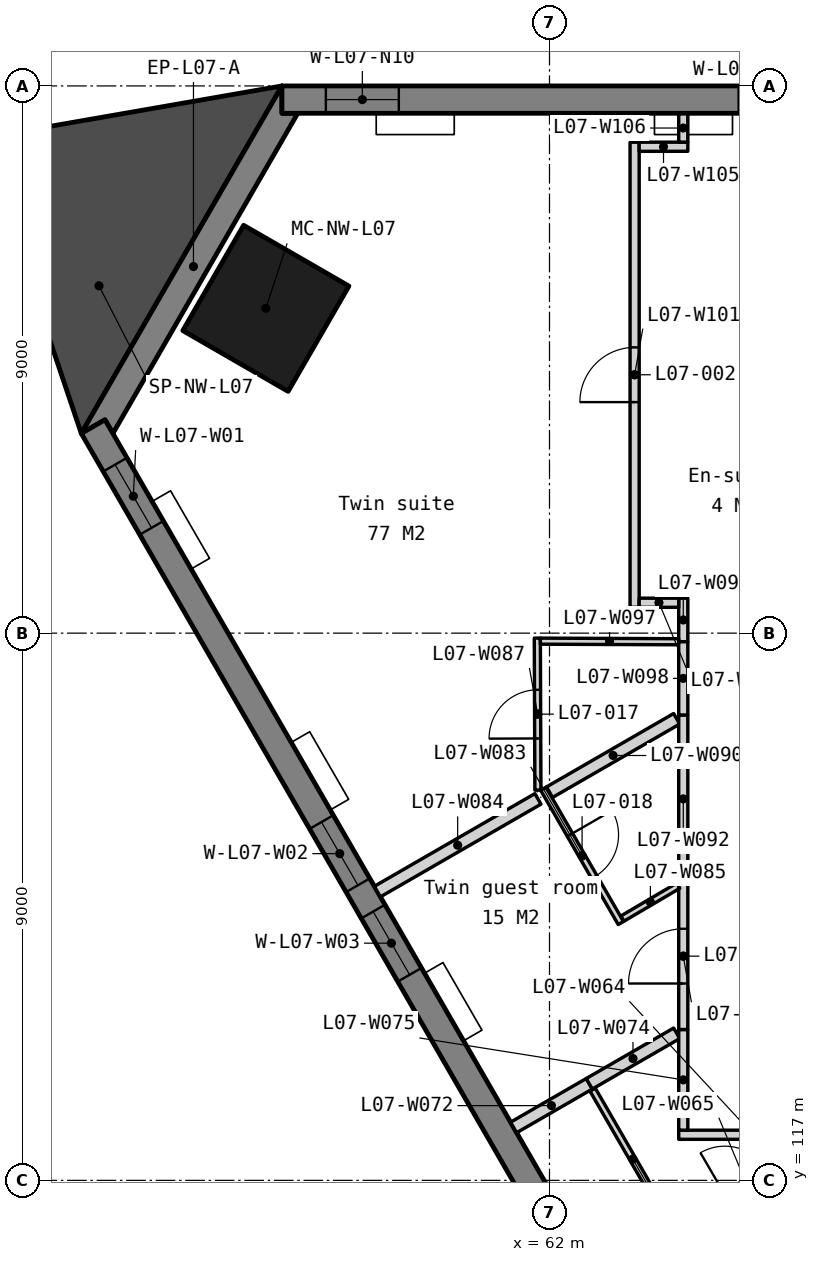
"""IFC4 building model, lengths in metres.
Left out: names, types, materials, properties, quantities, classifications, styles, units other than length and angle.
Written with IfcOpenShell. Run it as: python <this file> out.ifc"""

import sys

from ifc_helpers import new_model, si_unit, direction, frame, frame_2d, origin, origin_2d, place, context, subcontext, project, spatial, polyline, rectangle, outline, extrude, element, fill, save


model = new_model("IFC4")
c1 = context("Model", 3, precision=1e-05, world=origin(), true_north=direction((0.0, 1.0)))
c2 = subcontext(c1, "Body", "Model", "MODEL_VIEW")
j1 = project(units=[si_unit("LENGTHUNIT", "METRE"), si_unit("PLANEANGLEUNIT", "RADIAN")], contexts=[c1])
p1 = place(None, origin())
s1 = spatial("IfcSite", under=j1, at=p1, CompositionType="ELEMENT")
p2 = place(p1, origin())
s2 = spatial("IfcBuilding", under=s1, at=p2, CompositionType="ELEMENT")
p3 = place(p2, frame((0.0, 0.0, 38.5)))
s3 = spatial("IfcBuildingStorey", under=s2, at=p3, CompositionType="ELEMENT", Elevation=38.5)
p4 = place(p3, frame((57.336, 131.342, 0.0), z_axis=(0.0, 0.0, 1.0), x_axis=(-0.5, -0.866025403784, 0.0)))
e1 = element("IfcColumn", 1, at=p4, inside=s3, PredefinedType="COLUMN", context=c2, shape_type="SweptSolid", body=[
    extrude(rectangle(XDim=2.0, YDim=2.0, at=origin_2d()), origin(), (0.0, 0.0, 1.0), 3.5),
])
p5 = place(p3, frame((0.0, 0.0, -0.15)))
e2 = element("IfcWall", 2, at=p5, inside=s3, PredefinedType="SOLIDWALL", context=c2, shape_type="SweptSolid", body=[
    extrude(outline(polyline([(57.6, 135.0), (57.6, 134.55), (57.86, 134.55), (54.82, 129.284), (54.69, 129.509), (54.3, 129.284), (57.6, 135.0)])), origin(), (0.0, 0.0, 1.0), 3.5),
])
p6 = place(p3, frame((102.4, 134.775, -0.15), z_axis=(0.0, 0.0, 1.0), x_axis=(-1.0, 0.0, 0.0)))
e3 = element("IfcWall", 3, at=p6, inside=s3, PredefinedType="SOLIDWALL", context=c2, shape_type="SweptSolid", body=[
    extrude(outline(polyline([(44.8, 0.0), (44.8, 3.5), (0.0, 3.5), (0.0, 0.0), (44.8, 0.0)])), frame((0.0, 0.225, 0.0), z_axis=(0.0, -1.0, 0.0), x_axis=(1.0, 0.0, 0.0)), (0.0, 0.0, 1.0), 0.45),
])
p7 = place(p6, frame((0.722, 0.0, 1.05)))
e4 = element("IfcOpeningElement", 4, at=p7, cuts=e3, PredefinedType="OPENING", context=c2, shape_type="SweptSolid", body=[
    extrude(rectangle(XDim=1.2, YDim=1.5, at=frame_2d((0.6, 0.75))), frame((0.0, 0.235, 0.0), z_axis=(0.0, -1.0, 0.0), x_axis=(1.0, 0.0, 0.0)), (0.0, 0.0, 1.0), 0.47),
])
p8 = place(p6, frame((7.51, 0.0, 1.05)))
e5 = element("IfcOpeningElement", 5, at=p8, cuts=e3, PredefinedType="OPENING", context=c2, shape_type="SweptSolid", body=[
    extrude(rectangle(XDim=1.2, YDim=1.5, at=frame_2d((0.6, 0.75))), frame((0.0, 0.235, 0.0), z_axis=(0.0, -1.0, 0.0), x_axis=(1.0, 0.0, 0.0)), (0.0, 0.0, 1.0), 0.47),
])
p9 = place(p6, frame((9.21, 0.0, 1.05)))
e6 = element("IfcOpeningElement", 6, at=p9, cuts=e3, PredefinedType="OPENING", context=c2, shape_type="SweptSolid", body=[
    extrude(rectangle(XDim=1.2, YDim=1.5, at=frame_2d((0.6, 0.75))), frame((0.0, 0.235, 0.0), z_axis=(0.0, -1.0, 0.0), x_axis=(1.0, 0.0, 0.0)), (0.0, 0.0, 1.0), 0.47),
])
p10 = place(p6, frame((16.47, 0.0, 1.05)))
e7 = element("IfcOpeningElement", 7, at=p10, cuts=e3, PredefinedType="OPENING", context=c2, shape_type="SweptSolid", body=[
    extrude(rectangle(XDim=1.2, YDim=1.5, at=frame_2d((0.6, 0.75))), frame((0.0, 0.235, 0.0), z_axis=(0.0, -1.0, 0.0), x_axis=(1.0, 0.0, 0.0)), (0.0, 0.0, 1.0), 0.47),
])
p11 = place(p6, frame((18.17, 0.0, 1.05)))
e8 = element("IfcOpeningElement", 8, at=p11, cuts=e3, PredefinedType="OPENING", context=c2, shape_type="SweptSolid", body=[
    extrude(rectangle(XDim=1.2, YDim=1.5, at=frame_2d((0.6, 0.75))), frame((0.0, 0.235, 0.0), z_axis=(0.0, -1.0, 0.0), x_axis=(1.0, 0.0, 0.0)), (0.0, 0.0, 1.0), 0.47),
])
p12 = place(p6, frame((25.43, 0.0, 1.05)))
e9 = element("IfcOpeningElement", 9, at=p12, cuts=e3, PredefinedType="OPENING", context=c2, shape_type="SweptSolid", body=[
    extrude(rectangle(XDim=1.2, YDim=1.5, at=frame_2d((0.6, 0.75))), frame((0.0, 0.235, 0.0), z_axis=(0.0, -1.0, 0.0), x_axis=(1.0, 0.0, 0.0)), (0.0, 0.0, 1.0), 0.47),
])
p13 = place(p6, frame((27.13, 0.0, 1.05)))
e10 = element("IfcOpeningElement", 10, at=p13, cuts=e3, PredefinedType="OPENING", context=c2, shape_type="SweptSolid", body=[
    extrude(rectangle(XDim=1.2, YDim=1.5, at=frame_2d((0.6, 0.75))), frame((0.0, 0.235, 0.0), z_axis=(0.0, -1.0, 0.0), x_axis=(1.0, 0.0, 0.0)), (0.0, 0.0, 1.0), 0.47),
])
p14 = place(p6, frame((34.39, 0.0, 1.05)))
e11 = element("IfcOpeningElement", 11, at=p14, cuts=e3, PredefinedType="OPENING", context=c2, shape_type="SweptSolid", body=[
    extrude(rectangle(XDim=1.2, YDim=1.5, at=frame_2d((0.6, 0.75))), frame((0.0, 0.235, 0.0), z_axis=(0.0, -1.0, 0.0), x_axis=(1.0, 0.0, 0.0)), (0.0, 0.0, 1.0), 0.47),
])
p15 = place(p6, frame((36.09, 0.0, 1.05)))
e12 = element("IfcOpeningElement", 12, at=p15, cuts=e3, PredefinedType="OPENING", context=c2, shape_type="SweptSolid", body=[
    extrude(rectangle(XDim=1.2, YDim=1.5, at=frame_2d((0.6, 0.75))), frame((0.0, 0.235, 0.0), z_axis=(0.0, -1.0, 0.0), x_axis=(1.0, 0.0, 0.0)), (0.0, 0.0, 1.0), 0.47),
])
p16 = place(p6, frame((42.878, 0.0, 1.05)))
e13 = element("IfcOpeningElement", 13, at=p16, cuts=e3, PredefinedType="OPENING", context=c2, shape_type="SweptSolid", body=[
    extrude(rectangle(XDim=1.2, YDim=1.5, at=frame_2d((0.6, 0.75))), frame((0.0, 0.235, 0.0), z_axis=(0.0, -1.0, 0.0), x_axis=(1.0, 0.0, 0.0)), (0.0, 0.0, 1.0), 0.47),
])
p17 = place(p3, frame((54.495, 129.397, -0.15), z_axis=(0.0, 0.0, 1.0), x_axis=(0.499999201451, -0.866025864826, 0.0)))
e14 = element("IfcWall", 14, at=p17, inside=s3, PredefinedType="SOLIDWALL", context=c2, shape_type="SweptSolid", body=[
    extrude(outline(polyline([(44.8, 0.0), (44.8, 3.5), (0.0, 3.5), (0.0, 0.0), (44.8, 0.0)])), frame((0.0, 0.225, 0.0), z_axis=(0.0, -1.0, 0.0), x_axis=(1.0, 0.0, 0.0)), (0.0, 0.0, 1.0), 0.45),
])
p18 = place(p17, frame((0.722, 0.0, 1.05)))
e15 = element("IfcOpeningElement", 15, at=p18, cuts=e14, PredefinedType="OPENING", context=c2, shape_type="SweptSolid", body=[
    extrude(rectangle(XDim=1.2, YDim=1.5, at=frame_2d((0.6, 0.75))), frame((0.0, 0.235, 0.0), z_axis=(0.0, -1.0, 0.0), x_axis=(1.0, 0.0, 0.0)), (0.0, 0.0, 1.0), 0.47),
])
p19 = place(p17, frame((7.51, 0.0, 1.05)))
e16 = element("IfcOpeningElement", 16, at=p19, cuts=e14, PredefinedType="OPENING", context=c2, shape_type="SweptSolid", body=[
    extrude(rectangle(XDim=1.2, YDim=1.5, at=frame_2d((0.6, 0.75))), frame((0.0, 0.235, 0.0), z_axis=(0.0, -1.0, 0.0), x_axis=(1.0, 0.0, 0.0)), (0.0, 0.0, 1.0), 0.47),
])
p20 = place(p17, frame((9.21, 0.0, 1.05)))
e17 = element("IfcOpeningElement", 17, at=p20, cuts=e14, PredefinedType="OPENING", context=c2, shape_type="SweptSolid", body=[
    extrude(rectangle(XDim=1.2, YDim=1.5, at=frame_2d((0.6, 0.75))), frame((0.0, 0.235, 0.0), z_axis=(0.0, -1.0, 0.0), x_axis=(1.0, 0.0, 0.0)), (0.0, 0.0, 1.0), 0.47),
])
p21 = place(p17, frame((16.47, 0.0, 1.05)))
e18 = element("IfcOpeningElement", 18, at=p21, cuts=e14, PredefinedType="OPENING", context=c2, shape_type="SweptSolid", body=[
    extrude(rectangle(XDim=1.2, YDim=1.5, at=frame_2d((0.6, 0.75))), frame((0.0, 0.235, 0.0), z_axis=(0.0, -1.0, 0.0), x_axis=(1.0, 0.0, 0.0)), (0.0, 0.0, 1.0), 0.47),
])
p22 = place(p17, frame((18.17, 0.0, 1.05)))
e19 = element("IfcOpeningElement", 19, at=p22, cuts=e14, PredefinedType="OPENING", context=c2, shape_type="SweptSolid", body=[
    extrude(rectangle(XDim=1.2, YDim=1.5, at=frame_2d((0.6, 0.75))), frame((0.0, 0.235, 0.0), z_axis=(0.0, -1.0, 0.0), x_axis=(1.0, 0.0, 0.0)), (0.0, 0.0, 1.0), 0.47),
])
p23 = place(p17, frame((25.43, 0.0, 1.05)))
e20 = element("IfcOpeningElement", 20, at=p23, cuts=e14, PredefinedType="OPENING", context=c2, shape_type="SweptSolid", body=[
    extrude(rectangle(XDim=1.2, YDim=1.5, at=frame_2d((0.6, 0.75))), frame((0.0, 0.235, 0.0), z_axis=(0.0, -1.0, 0.0), x_axis=(1.0, 0.0, 0.0)), (0.0, 0.0, 1.0), 0.47),
])
p24 = place(p17, frame((27.13, 0.0, 1.05)))
e21 = element("IfcOpeningElement", 21, at=p24, cuts=e14, PredefinedType="OPENING", context=c2, shape_type="SweptSolid", body=[
    extrude(rectangle(XDim=1.2, YDim=1.5, at=frame_2d((0.6, 0.75))), frame((0.0, 0.235, 0.0), z_axis=(0.0, -1.0, 0.0), x_axis=(1.0, 0.0, 0.0)), (0.0, 0.0, 1.0), 0.47),
])
p25 = place(p17, frame((34.39, 0.0, 1.05)))
e22 = element("IfcOpeningElement", 22, at=p25, cuts=e14, PredefinedType="OPENING", context=c2, shape_type="SweptSolid", body=[
    extrude(rectangle(XDim=1.2, YDim=1.5, at=frame_2d((0.6, 0.75))), frame((0.0, 0.235, 0.0), z_axis=(0.0, -1.0, 0.0), x_axis=(1.0, 0.0, 0.0)), (0.0, 0.0, 1.0), 0.47),
])
p26 = place(p17, frame((36.09, 0.0, 1.05)))
e23 = element("IfcOpeningElement", 23, at=p26, cuts=e14, PredefinedType="OPENING", context=c2, shape_type="SweptSolid", body=[
    extrude(rectangle(XDim=1.2, YDim=1.5, at=frame_2d((0.6, 0.75))), frame((0.0, 0.235, 0.0), z_axis=(0.0, -1.0, 0.0), x_axis=(1.0, 0.0, 0.0)), (0.0, 0.0, 1.0), 0.47),
])
p27 = place(p17, frame((42.878, 0.0, 1.05)))
e24 = element("IfcOpeningElement", 24, at=p27, cuts=e14, PredefinedType="OPENING", context=c2, shape_type="SweptSolid", body=[
    extrude(rectangle(XDim=1.2, YDim=1.5, at=frame_2d((0.6, 0.75))), frame((0.0, 0.235, 0.0), z_axis=(0.0, -1.0, 0.0), x_axis=(1.0, 0.0, 0.0)), (0.0, 0.0, 1.0), 0.47),
])
p28 = place(p3, frame((0.0, 0.0, -0.15)))
e25 = element("IfcWall", 25, at=p28, inside=s3, PredefinedType="SOLIDWALL", context=c2, shape_type="SweptSolid", body=[
    extrude(outline(polyline([(57.6, 135.0), (52.664, 134.14), (54.3, 129.284), (57.6, 135.0)])), origin(), (0.0, 0.0, 1.0), 3.5),
])
p29 = place(p3, frame((62.709, 118.493, 0.0), z_axis=(0.0, 0.0, 1.0), x_axis=(0.500048002682, -0.865997687649, 0.0)))
e26 = element("IfcWall", 26, at=p29, inside=s3, PredefinedType="PARTITIONING", context=c2, shape_type="SweptSolid", body=[
    extrude(rectangle(XDim=2.64, YDim=0.1, at=frame_2d((1.32, 0.0))), origin(), (0.0, 0.0, 1.0), 3.35),
])
p30 = place(p3, frame((64.125, 117.75, 0.0), z_axis=(0.0, 0.0, 1.0), x_axis=(1.0, 0.0, 0.0)))
e27 = element("IfcWall", 27, at=p30, inside=s3, PredefinedType="PARTITIONING", context=c2, shape_type="SweptSolid", body=[
    extrude(rectangle(XDim=2.457, YDim=0.15, at=frame_2d((1.229, 0.0))), origin(), (0.0, 0.0, 1.0), 3.35),
])
p31 = place(p3, frame((64.056, 116.28, 0.0), z_axis=(0.0, 0.0, 1.0), x_axis=(0.864358276906, 0.50287649492, 0.0)))
e28 = element("IfcWall", 28, at=p31, inside=s3, PredefinedType="PARTITIONING", context=c2, shape_type="SweptSolid", body=[
    extrude(rectangle(XDim=2.718, YDim=0.1, at=frame_2d((1.359, 0.0))), origin(), (0.0, 0.0, 1.0), 3.35),
])
p32 = place(p31, frame((0.959, 0.0, 0.0)))
e29 = element("IfcOpeningElement", 29, at=p32, cuts=e28, PredefinedType="OPENING", context=c2, shape_type="SweptSolid", body=[
    extrude(rectangle(XDim=0.8, YDim=2.1, at=frame_2d((0.4, 1.05))), frame((0.0, 0.06, 0.0), z_axis=(0.0, -1.0, 0.0), x_axis=(1.0, 0.0, 0.0)), (0.0, 0.0, 1.0), 0.12),
])
p33 = place(p3, frame((61.41, 117.87, 0.0), z_axis=(0.0, 0.0, 1.0), x_axis=(0.866007328409, 0.500031306162, 0.0)))
e30 = element("IfcWall", 30, at=p33, inside=s3, PredefinedType="PARTITIONING", context=c2, shape_type="SweptSolid", body=[
    extrude(rectangle(XDim=1.437, YDim=0.2, at=frame_2d((0.719, 0.0))), origin(), (0.0, 0.0, 1.0), 3.35),
])
p34 = place(p3, frame((62.654, 118.588, 0.0), z_axis=(0.0, 0.0, 1.0), x_axis=(0.866090081402, 0.499887958344, 0.0)))
e31 = element("IfcWall", 31, at=p34, inside=s3, PredefinedType="PARTITIONING", context=c2, shape_type="SweptSolid", body=[
    extrude(rectangle(XDim=1.66, YDim=0.2, at=frame_2d((0.83, 0.0))), origin(), (0.0, 0.0, 1.0), 3.35),
])
p35 = place(p3, frame((64.2, 117.825, 0.0), z_axis=(0.0, 0.0, 1.0), x_axis=(0.0, 1.0, 0.0)))
e32 = element("IfcWall", 32, at=p35, inside=s3, PredefinedType="PARTITIONING", context=c2, shape_type="SweptSolid", body=[
    extrude(rectangle(XDim=1.656, YDim=0.15, at=frame_2d((0.828, 0.0))), origin(), (0.0, 0.0, 1.0), 3.35),
])
p36 = place(p3, frame((64.2, 119.481, 0.0), z_axis=(0.0, 0.0, 1.0), x_axis=(0.0, 1.0, 0.0)))
e33 = element("IfcWall", 33, at=p36, inside=s3, PredefinedType="PARTITIONING", context=c2, shape_type="SweptSolid", body=[
    extrude(rectangle(XDim=2.413, YDim=0.15, at=frame_2d((1.207, 0.0))), origin(), (0.0, 0.0, 1.0), 3.35),
])
p37 = place(p36, frame((0.757, 0.0, 0.0)))
e34 = element("IfcOpeningElement", 34, at=p37, cuts=e33, PredefinedType="OPENING", context=c2, shape_type="SweptSolid", body=[
    extrude(rectangle(XDim=0.9, YDim=2.1, at=frame_2d((0.45, 1.05))), frame((0.0, 0.085, 0.0), z_axis=(0.0, -1.0, 0.0), x_axis=(1.0, 0.0, 0.0)), (0.0, 0.0, 1.0), 0.17),
])
p38 = place(p3, frame((61.898, 123.44, 0.0), z_axis=(0.0, 0.0, 1.0), x_axis=(0.499990435942, -0.866030925526, 0.0)))
e35 = element("IfcWall", 35, at=p38, inside=s3, PredefinedType="PARTITIONING", context=c2, shape_type="SweptSolid", body=[
    extrude(rectangle(XDim=2.55, YDim=0.1, at=frame_2d((1.275, 0.0))), origin(), (0.0, 0.0, 1.0), 3.35),
])
p39 = place(p38, frame((0.875, 0.0, 0.0)))
e36 = element("IfcOpeningElement", 36, at=p39, cuts=e35, PredefinedType="OPENING", context=c2, shape_type="SweptSolid", body=[
    extrude(rectangle(XDim=0.8, YDim=2.1, at=frame_2d((0.4, 1.05))), frame((0.0, 0.06, 0.0), z_axis=(0.0, -1.0, 0.0), x_axis=(1.0, 0.0, 0.0)), (0.0, 0.0, 1.0), 0.12),
])
p40 = place(p3, frame((59.17, 121.75, 0.0), z_axis=(0.0, 0.0, 1.0), x_axis=(0.86606157367, 0.499937346687, 0.0)))
e37 = element("IfcWall", 37, at=p40, inside=s3, PredefinedType="PARTITIONING", context=c2, shape_type="SweptSolid", body=[
    extrude(rectangle(XDim=3.049, YDim=0.2, at=frame_2d((1.524, 0.0))), origin(), (0.0, 0.0, 1.0), 3.35),
])
p41 = place(p3, frame((63.2, 121.306, 0.0), z_axis=(0.0, 0.0, 1.0), x_axis=(0.86196956313, 0.506960030216, 0.0)))
e38 = element("IfcWall", 38, at=p41, inside=s3, PredefinedType="PARTITIONING", context=c2, shape_type="SweptSolid", body=[
    extrude(rectangle(XDim=1.065, YDim=0.1, at=frame_2d((0.533, 0.0))), origin(), (0.0, 0.0, 1.0), 3.35),
])
p42 = place(p3, frame((61.809, 123.418, 0.0), z_axis=(0.0, 0.0, 1.0), x_axis=(-0.003807822423, 0.999992750218, 0.0)))
e39 = element("IfcWall", 39, at=p42, inside=s3, PredefinedType="PARTITIONING", context=c2, shape_type="SweptSolid", body=[
    extrude(rectangle(XDim=2.5, YDim=0.1, at=frame_2d((1.25, 0.0))), origin(), (0.0, 0.0, 1.0), 3.35),
])
p43 = place(p42, frame((0.85, 0.0, 0.0)))
e40 = element("IfcOpeningElement", 40, at=p43, cuts=e39, PredefinedType="OPENING", context=c2, shape_type="SweptSolid", body=[
    extrude(rectangle(XDim=0.8, YDim=2.1, at=frame_2d((0.4, 1.05))), frame((0.0, 0.06, 0.0), z_axis=(0.0, -1.0, 0.0), x_axis=(1.0, 0.0, 0.0)), (0.0, 0.0, 1.0), 0.12),
])
p44 = place(p3, frame((62.0, 123.384, 0.0), z_axis=(0.0, 0.0, 1.0), x_axis=(0.866032396701, 0.499987887718, 0.0)))
e41 = element("IfcWall", 41, at=p44, inside=s3, PredefinedType="PARTITIONING", context=c2, shape_type="SweptSolid", body=[
    extrude(rectangle(XDim=2.415, YDim=0.2, at=frame_2d((1.208, 0.0))), origin(), (0.0, 0.0, 1.0), 3.35),
])
p45 = place(p3, frame((64.2, 121.894, 0.0), z_axis=(0.0, 0.0, 1.0), x_axis=(0.0, 1.0, 0.0)))
e42 = element("IfcWall", 42, at=p45, inside=s3, PredefinedType="PARTITIONING", context=c2, shape_type="SweptSolid", body=[
    extrude(rectangle(XDim=2.76, YDim=0.15, at=frame_2d((1.38, 0.0))), origin(), (0.0, 0.0, 1.0), 3.35),
])
p46 = place(p3, frame((64.2, 125.858, 0.0), z_axis=(0.0, 0.0, 1.0), x_axis=(0.0, 1.0, 0.0)))
e43 = element("IfcWall", 43, at=p46, inside=s3, PredefinedType="PARTITIONING", context=c2, shape_type="SweptSolid", body=[
    extrude(rectangle(XDim=0.717, YDim=0.15, at=frame_2d((0.358, 0.0))), origin(), (0.0, 0.0, 1.0), 3.35),
])
p47 = place(p3, frame((61.85, 125.868, 0.0), z_axis=(0.0, 0.0, 1.0), x_axis=(0.999991684538, -0.004078094442, 0.0)))
e44 = element("IfcWall", 44, at=p47, inside=s3, PredefinedType="PARTITIONING", context=c2, shape_type="SweptSolid", body=[
    extrude(rectangle(XDim=2.275, YDim=0.1, at=frame_2d((1.137, 0.0))), origin(), (0.0, 0.0, 1.0), 3.35),
])
p48 = place(p3, frame((64.2, 124.654, 0.0), z_axis=(0.0, 0.0, 1.0), x_axis=(0.0, 1.0, 0.0)))
e45 = element("IfcWall", 45, at=p48, inside=s3, PredefinedType="PARTITIONING", context=c2, shape_type="SweptSolid", body=[
    extrude(rectangle(XDim=1.204, YDim=0.15, at=frame_2d((0.602, 0.0))), origin(), (0.0, 0.0, 1.0), 3.35),
])
p49 = place(p3, frame((63.4, 126.425, 0.0), z_axis=(0.0, 0.0, 1.0), x_axis=(0.0, 1.0, 0.0)))
e46 = element("IfcWall", 46, at=p49, inside=s3, PredefinedType="PARTITIONING", context=c2, shape_type="SweptSolid", body=[
    extrude(rectangle(XDim=7.649, YDim=0.15, at=frame_2d((3.825, 0.0))), origin(), (0.0, 0.0, 1.0), 3.35),
])
p50 = place(p49, frame((3.375, 0.0, 0.0)))
e47 = element("IfcOpeningElement", 47, at=p50, cuts=e46, PredefinedType="OPENING", context=c2, shape_type="SweptSolid", body=[
    extrude(rectangle(XDim=0.9, YDim=2.1, at=frame_2d((0.45, 1.05))), frame((0.0, 0.085, 0.0), z_axis=(0.0, -1.0, 0.0), x_axis=(1.0, 0.0, 0.0)), (0.0, 0.0, 1.0), 0.17),
])
p51 = place(p3, frame((63.475, 126.5, 0.0), z_axis=(0.0, 0.0, 1.0), x_axis=(1.0, 0.0, 0.0)))
e48 = element("IfcWall", 48, at=p51, inside=s3, PredefinedType="PARTITIONING", context=c2, shape_type="SweptSolid", body=[
    extrude(rectangle(XDim=0.65, YDim=0.15, at=frame_2d((0.325, 0.0))), origin(), (0.0, 0.0, 1.0), 3.35),
])
p52 = place(p3, frame((63.475, 134.0, 0.0), z_axis=(0.0, 0.0, 1.0), x_axis=(0.999999813645, 0.000610500497, 0.0)))
e49 = element("IfcWall", 49, at=p52, inside=s3, PredefinedType="PARTITIONING", context=c2, shape_type="SweptSolid", body=[
    extrude(rectangle(XDim=0.8, YDim=0.15, at=frame_2d((0.4, 0.0))), origin(), (0.0, 0.0, 1.0), 2.887),
])
p53 = place(p3, frame((64.2, 134.075, 0.0), z_axis=(0.0, 0.0, 1.0), x_axis=(0.0, 1.0, 0.0)))
e50 = element("IfcWall", 50, at=p53, inside=s3, PredefinedType="PARTITIONING", context=c2, shape_type="SweptSolid", body=[
    extrude(rectangle(XDim=0.465, YDim=0.15, at=frame_2d((0.232, 0.0))), origin(), (0.0, 0.0, 1.0), 3.35),
])
p54 = place(p15, origin())
e51 = element("IfcWindow", 51, at=p54, inside=s3, PartitioningType="SINGLE_PANEL", PredefinedType="WINDOW", context=c2, shape_type="SweptSolid", body=[
    extrude(rectangle(XDim=1.2, YDim=1.5, at=frame_2d((0.6, 0.75))), frame((0.0, 0.03, 0.0), z_axis=(0.0, -1.0, 0.0), x_axis=(1.0, 0.0, 0.0)), (0.0, 0.0, 1.0), 0.06),
])
fill(e12, e51)
p55 = place(p16, origin())
e52 = element("IfcWindow", 52, at=p55, inside=s3, PartitioningType="SINGLE_PANEL", PredefinedType="WINDOW", context=c2, shape_type="SweptSolid", body=[
    extrude(rectangle(XDim=1.2, YDim=1.5, at=frame_2d((0.6, 0.75))), frame((0.0, 0.03, 0.0), z_axis=(0.0, -1.0, 0.0), x_axis=(1.0, 0.0, 0.0)), (0.0, 0.0, 1.0), 0.06),
])
fill(e13, e52)
p56 = place(p18, origin())
e53 = element("IfcWindow", 53, at=p56, inside=s3, PartitioningType="SINGLE_PANEL", PredefinedType="WINDOW", context=c2, shape_type="SweptSolid", body=[
    extrude(rectangle(XDim=1.2, YDim=1.5, at=frame_2d((0.6, 0.75))), frame((0.0, 0.03, 0.0), z_axis=(0.0, -1.0, 0.0), x_axis=(1.0, 0.0, 0.0)), (0.0, 0.0, 1.0), 0.06),
])
fill(e15, e53)
p57 = place(p19, origin())
e54 = element("IfcWindow", 54, at=p57, inside=s3, PartitioningType="SINGLE_PANEL", PredefinedType="WINDOW", context=c2, shape_type="SweptSolid", body=[
    extrude(rectangle(XDim=1.2, YDim=1.5, at=frame_2d((0.6, 0.75))), frame((0.0, 0.03, 0.0), z_axis=(0.0, -1.0, 0.0), x_axis=(1.0, 0.0, 0.0)), (0.0, 0.0, 1.0), 0.06),
])
fill(e16, e54)
p58 = place(p20, origin())
e55 = element("IfcWindow", 55, at=p58, inside=s3, PartitioningType="SINGLE_PANEL", PredefinedType="WINDOW", context=c2, shape_type="SweptSolid", body=[
    extrude(rectangle(XDim=1.2, YDim=1.5, at=frame_2d((0.6, 0.75))), frame((0.0, 0.03, 0.0), z_axis=(0.0, -1.0, 0.0), x_axis=(1.0, 0.0, 0.0)), (0.0, 0.0, 1.0), 0.06),
])
fill(e17, e55)
p59 = place(p50, origin())
e56 = element("IfcDoor", 56, at=p59, inside=s3, OperationType="SINGLE_SWING_LEFT", PredefinedType="DOOR", context=c2, shape_type="SweptSolid", body=[
    extrude(rectangle(XDim=0.9, YDim=2.1, at=frame_2d((0.45, 1.05))), frame((0.0, 0.025, 0.0), z_axis=(0.0, -1.0, 0.0), x_axis=(1.0, 0.0, 0.0)), (0.0, 0.0, 1.0), 0.05),
])
fill(e47, e56)
p60 = place(p37, origin())
e57 = element("IfcDoor", 57, at=p60, inside=s3, OperationType="SINGLE_SWING_LEFT", PredefinedType="DOOR", context=c2, shape_type="SweptSolid", body=[
    extrude(rectangle(XDim=0.9, YDim=2.1, at=frame_2d((0.45, 1.05))), frame((0.0, 0.025, 0.0), z_axis=(0.0, -1.0, 0.0), x_axis=(1.0, 0.0, 0.0)), (0.0, 0.0, 1.0), 0.05),
])
fill(e34, e57)
p61 = place(p43, origin())
e58 = element("IfcDoor", 58, at=p61, inside=s3, OperationType="SINGLE_SWING_LEFT", PredefinedType="DOOR", context=c2, shape_type="SweptSolid", body=[
    extrude(rectangle(XDim=0.8, YDim=2.1, at=frame_2d((0.4, 1.05))), frame((0.0, 0.025, 0.0), z_axis=(0.0, -1.0, 0.0), x_axis=(1.0, 0.0, 0.0)), (0.0, 0.0, 1.0), 0.05),
])
fill(e40, e58)
p62 = place(p39, origin())
e59 = element("IfcDoor", 59, at=p62, inside=s3, OperationType="SINGLE_SWING_LEFT", PredefinedType="DOOR", context=c2, shape_type="SweptSolid", body=[
    extrude(rectangle(XDim=0.8, YDim=2.1, at=frame_2d((0.4, 1.05))), frame((0.0, 0.025, 0.0), z_axis=(0.0, -1.0, 0.0), x_axis=(1.0, 0.0, 0.0)), (0.0, 0.0, 1.0), 0.05),
])
fill(e36, e59)
p63 = place(p32, origin())
e60 = element("IfcDoor", 60, at=p63, inside=s3, OperationType="SINGLE_SWING_LEFT", PredefinedType="DOOR", context=c2, shape_type="SweptSolid", body=[
    extrude(rectangle(XDim=0.8, YDim=2.1, at=frame_2d((0.4, 1.05))), frame((0.0, 0.025, 0.0), z_axis=(0.0, -1.0, 0.0), x_axis=(1.0, 0.0, 0.0)), (0.0, 0.0, 1.0), 0.05),
])
fill(e29, e60)
save(model, sys.argv[1])
